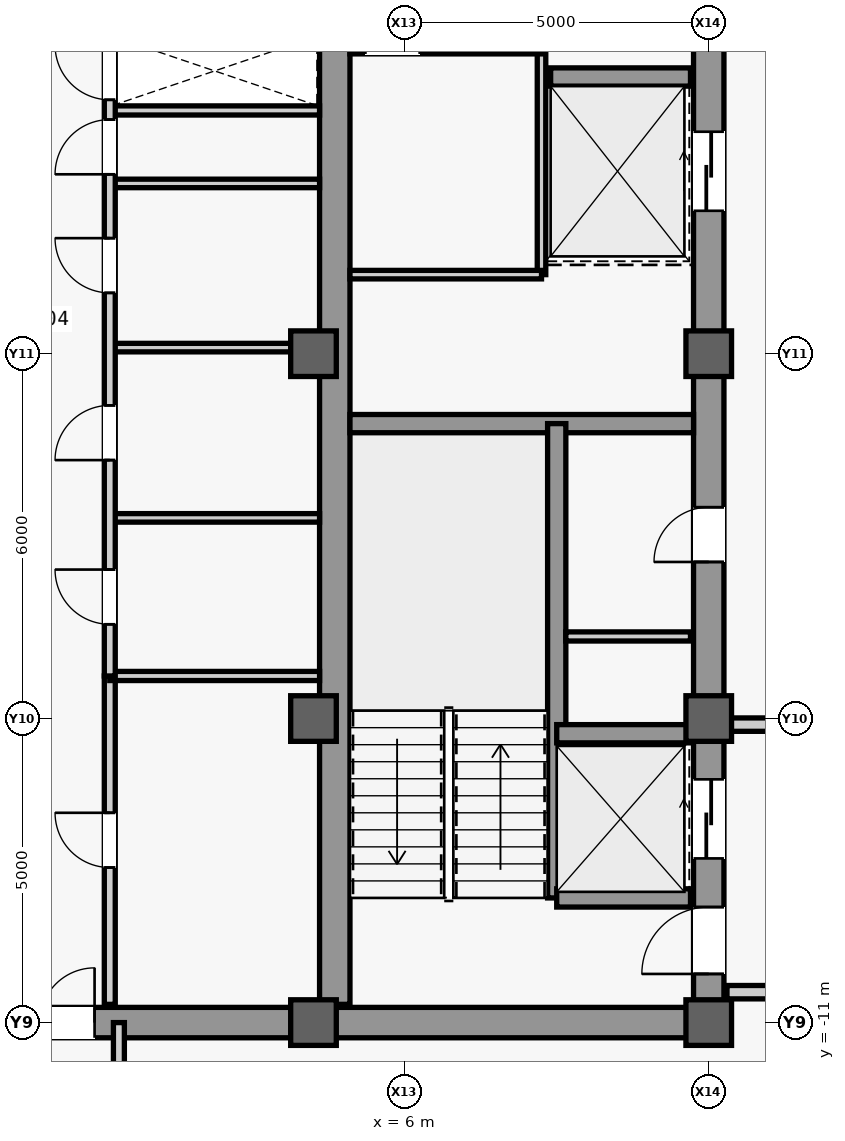
"""IFC4 building model, lengths in metres.
Left out: names, types, materials, properties, quantities, classifications, styles, units other than length and angle.
Written with IfcOpenShell. Run it as: python <this file> out.ifc"""

import sys

from ifc_helpers import new_model, si_unit, direction, frame, frame_2d, origin, origin_2d, place, context, subcontext, project, spatial, rectangle, extrude, source, transform, mapped, element, fill, save


model = new_model("IFC4")
c1 = context("Model", 3, precision=1e-05, world=origin(), true_north=direction((0.0, 1.0)))
c2 = subcontext(c1, "Body", "Model", "MODEL_VIEW")
j1 = project(units=[si_unit("LENGTHUNIT", "METRE"), si_unit("PLANEANGLEUNIT", "RADIAN")], contexts=[c1])
p1 = place(None, origin())
s1 = spatial("IfcSite", under=j1, at=p1, CompositionType="ELEMENT")
p2 = place(p1, origin())
s2 = spatial("IfcBuilding", under=s1, at=p2, CompositionType="ELEMENT")
p3 = place(p2, frame((0.0, 0.0, 326.3)))
s3 = spatial("IfcBuildingStorey", under=s2, at=p3, CompositionType="ELEMENT", Elevation=326.3)
m1 = source(origin(), c2, "Body", "SweptSolid", [
    extrude(rectangle(XDim=22.0, YDim=0.5, at=frame_2d((11.0, 0.0))), origin(), (0.0, 0.0, 1.0), 3.74),
])
p4 = place(p3, frame((11.0, -11.0, 0.0), z_axis=(0.0, 0.0, 1.0), x_axis=(0.0, 1.0, 0.0)))
e1 = element("IfcWall", 1, at=p4, inside=s3, PredefinedType="SHEAR", context=c2, shape_type="MappedRepresentation", body=[
    mapped(m1, transform((0.0, 0.0, 0.0), scale=1.0)),
])
m2 = source(origin(), c2, "Body", "SweptSolid", [
    extrude(rectangle(XDim=1.1, YDim=2.2, at=frame_2d((0.55, 1.1))), frame((0.0, 0.26, 0.0), z_axis=(0.0, -1.0, 0.0), x_axis=(1.0, 0.0, 0.0)), (0.0, 0.0, 1.0), 0.52),
])
p5 = place(p4, frame((0.8, 0.0, 0.0)))
e2 = element("IfcOpeningElement", 2, at=p5, cuts=e1, PredefinedType="OPENING", context=c2, shape_type="MappedRepresentation", body=[
    mapped(m2, transform((0.0, 0.0, 0.0), scale=1.0)),
])
m3 = source(origin(), c2, "Body", "SweptSolid", [
    extrude(rectangle(XDim=0.9, YDim=2.15, at=frame_2d((0.45, 1.075))), frame((0.0, 0.26, 0.0), z_axis=(0.0, -1.0, 0.0), x_axis=(1.0, 0.0, 0.0)), (0.0, 0.0, 1.0), 0.52),
])
p6 = place(p4, frame((7.575, 0.0, 0.0)))
e3 = element("IfcOpeningElement", 3, at=p6, cuts=e1, PredefinedType="OPENING", context=c2, shape_type="MappedRepresentation", body=[
    mapped(m3, transform((0.0, 0.0, 0.0), scale=1.0)),
])
m4 = source(origin(), c2, "Body", "SweptSolid", [
    extrude(rectangle(XDim=1.2, YDim=2.3, at=frame_2d((0.6, 1.15))), frame((0.0, 0.26, 0.0), z_axis=(0.0, -1.0, 0.0), x_axis=(1.0, 0.0, 0.0)), (0.0, 0.0, 1.0), 0.52),
])
p7 = place(p4, frame((17.6, 0.0, 0.0)))
e4 = element("IfcOpeningElement", 4, at=p7, cuts=e1, PredefinedType="OPENING", context=c2, shape_type="MappedRepresentation", body=[
    mapped(m4, transform((0.0, 0.0, 0.0), scale=1.0)),
])
p8 = place(p4, frame((19.6, 0.0, 0.0)))
e5 = element("IfcOpeningElement", 5, at=p8, cuts=e1, PredefinedType="OPENING", context=c2, shape_type="MappedRepresentation", body=[
    mapped(m4, transform((0.0, 0.0, 0.0), scale=1.0)),
])
m5 = source(origin(), c2, "Body", "SweptSolid", [
    extrude(rectangle(XDim=1.3, YDim=2.3, at=frame_2d((0.65, 1.15))), frame((0.0, 0.26, 0.0), z_axis=(0.0, -1.0, 0.0), x_axis=(1.0, 0.0, 0.0)), (0.0, 0.0, 1.0), 0.52),
])
p9 = place(p4, frame((2.7, 0.0, 0.0)))
e6 = element("IfcOpeningElement", 6, at=p9, cuts=e1, PredefinedType="OPENING", context=c2, shape_type="MappedRepresentation", body=[
    mapped(m5, transform((0.0, 0.0, 0.0), scale=1.0)),
])
p10 = place(p4, frame((13.35, 0.0, 0.0)))
e7 = element("IfcOpeningElement", 7, at=p10, cuts=e1, PredefinedType="OPENING", context=c2, shape_type="MappedRepresentation", body=[
    mapped(m5, transform((0.0, 0.0, 0.0), scale=1.0)),
])
m6 = source(origin(), c2, "Body", "SweptSolid", [
    extrude(rectangle(XDim=21.4, YDim=0.5, at=frame_2d((10.7, 0.0))), origin(), (0.0, 0.0, 1.0), 3.74),
])
p11 = place(p3, frame((4.85, -10.7, 0.0), z_axis=(0.0, 0.0, 1.0), x_axis=(0.0, 1.0, 0.0)))
e8 = element("IfcWall", 8, at=p11, inside=s3, PredefinedType="SHEAR", context=c2, shape_type="MappedRepresentation", body=[
    mapped(m6, transform((0.0, 0.0, 0.0), scale=1.0)),
])
m7 = source(origin(), c2, "Body", "SweptSolid", [
    extrude(rectangle(XDim=5.9, YDim=0.5, at=frame_2d((2.95, 0.0))), origin(), (0.0, 0.0, 1.0), 3.74),
])
p12 = place(p3, frame((4.85, -11.0, 0.0), z_axis=(0.0, 0.0, 1.0), x_axis=(1.0, 0.0, 0.0)))
e9 = element("IfcWall", 9, at=p12, inside=s3, PredefinedType="SHEAR", context=c2, shape_type="MappedRepresentation", body=[
    mapped(m7, transform((0.0, 0.0, 0.0), scale=1.0)),
])
m8 = source(origin(), c2, "Body", "SweptSolid", [
    extrude(rectangle(XDim=5.65, YDim=0.3, at=frame_2d((2.825, 0.0))), origin(), (0.0, 0.0, 1.0), 3.74),
])
p13 = place(p3, frame((5.1, -1.15, 0.0), z_axis=(0.0, 0.0, 1.0), x_axis=(1.0, 0.0, 0.0)))
e10 = element("IfcWall", 10, at=p13, inside=s3, PredefinedType="SHEAR", context=c2, shape_type="MappedRepresentation", body=[
    mapped(m8, transform((0.0, 0.0, 0.0), scale=1.0)),
])
m9 = source(origin(), c2, "Body", "SweptSolid", [
    extrude(rectangle(XDim=9.2, YDim=0.5, at=frame_2d((4.6, 0.0))), origin(), (0.0, 0.0, 1.0), 3.74),
])
p14 = place(p3, frame((-4.6, -11.0, 0.0), z_axis=(0.0, 0.0, 1.0), x_axis=(1.0, 0.0, 0.0)))
e11 = element("IfcWall", 11, at=p14, inside=s3, PredefinedType="SHEAR", context=c2, shape_type="MappedRepresentation", body=[
    mapped(m9, transform((0.0, 0.0, 0.0), scale=1.0)),
])
m10 = source(origin(), c2, "Body", "SweptSolid", [
    extrude(rectangle(XDim=1.8, YDim=2.25, at=frame_2d((0.9, 1.125))), frame((0.0, 0.26, 0.0), z_axis=(0.0, -1.0, 0.0), x_axis=(1.0, 0.0, 0.0)), (0.0, 0.0, 1.0), 0.52),
])
p15 = place(p14, frame((3.7, 0.0, 0.0)))
e12 = element("IfcOpeningElement", 12, at=p15, cuts=e11, PredefinedType="OPENING", context=c2, shape_type="MappedRepresentation", body=[
    mapped(m10, transform((0.0, 0.0, 0.0), scale=1.0)),
])
m11 = source(origin(), c2, "Body", "SweptSolid", [
    extrude(rectangle(XDim=0.75, YDim=0.75, at=origin_2d()), origin(), (0.0, 0.0, 1.0), 4.0),
])
for number, where, z_axis, x_axis in (
    (13, (4.5, -11.0, 0.0), (0.0, 0.0, 1.0), (1.0, 0.0, 0.0)),
    (14, (4.5, -6.0, 0.0), (0.0, 0.0, 1.0), (1.0, 0.0, 0.0)),
    (15, (4.5, 0.0, 0.0), (0.0, 0.0, 1.0), (1.0, 0.0, 0.0)),
    (16, (11.0, -11.0, 0.0), (0.0, 0.0, 1.0), (1.0, 0.0, 0.0)),
    (17, (11.0, -6.0, 0.0), (0.0, 0.0, 1.0), (1.0, 0.0, 0.0)),
    (18, (11.0, 0.0, 0.0), (0.0, 0.0, 1.0), (1.0, 0.0, 0.0)),
):
    element("IfcColumn", number, at=place(p3, frame(where, z_axis=z_axis, x_axis=x_axis)), inside=s3, PredefinedType="COLUMN", context=c2, shape_type="MappedRepresentation", body=[
        mapped(m11, transform((0.0, 0.0, 0.0), scale=1.0)),
    ])
m12 = source(origin(), c2, "Body", "SweptSolid", [
    extrude(rectangle(XDim=7.8, YDim=0.3, at=frame_2d((3.9, 0.0))), origin(), (0.0, 0.0, 1.0), 3.74),
])
p16 = place(p3, frame((8.5, -8.95, 0.0), z_axis=(0.0, 0.0, 1.0), x_axis=(0.0, 1.0, 0.0)))
e19 = element("IfcWall", 19, at=p16, inside=s3, PredefinedType="SHEAR", context=c2, shape_type="MappedRepresentation", body=[
    mapped(m12, transform((0.0, 0.0, 0.0), scale=1.0)),
])
m13 = source(origin(), c2, "Body", "SweptSolid", [
    extrude(rectangle(XDim=2.2, YDim=0.3, at=frame_2d((1.1, 0.0))), origin(), (0.0, 0.0, 1.0), 3.74),
])
for number, where, z_axis, x_axis in (
    (20, (8.5, -8.95, 0.0), (0.0, 0.0, 1.0), (1.0, 0.0, 0.0)),
    (21, (8.5, -6.25, 0.0), (0.0, 0.0, 1.0), (1.0, 0.0, 0.0)),
):
    element("IfcWall", number, at=place(p3, frame(where, z_axis=z_axis, x_axis=x_axis)), inside=s3, PredefinedType="SHEAR", context=c2, shape_type="MappedRepresentation", body=[
        mapped(m13, transform((0.0, 0.0, 0.0), scale=1.0)),
    ])
m14 = source(origin(), c2, "Body", "SweptSolid", [
    extrude(rectangle(XDim=2.3, YDim=0.3, at=frame_2d((1.15, 0.0))), origin(), (0.0, 0.0, 1.0), 3.74),
])
p17 = place(p3, frame((8.4, 4.55, 0.0), z_axis=(0.0, 0.0, 1.0), x_axis=(1.0, 0.0, 0.0)))
e22 = element("IfcWall", 22, at=p17, inside=s3, PredefinedType="SHEAR", context=c2, shape_type="MappedRepresentation", body=[
    mapped(m14, transform((0.0, 0.0, 0.0), scale=1.0)),
])
m15 = source(origin(), c2, "Body", "SweptSolid", [
    extrude(rectangle(XDim=2.05, YDim=0.15, at=frame_2d((1.025, 0.0))), origin(), (0.0, 0.0, 1.0), 3.74),
])
p18 = place(p3, frame((8.65, -4.65, 0.0), z_axis=(0.0, 0.0, 1.0), x_axis=(1.0, 0.0, 0.0)))
e23 = element("IfcWall", 23, at=p18, inside=s3, PredefinedType="PARTITIONING", context=c2, shape_type="MappedRepresentation", body=[
    mapped(m15, transform((0.0, 0.0, 0.0), scale=1.0)),
])
m16 = source(origin(), c2, "Body", "SweptSolid", [
    extrude(rectangle(XDim=9.4, YDim=0.14, at=frame_2d((4.7, 0.0))), origin(), (0.0, 0.0, 1.0), 3.74),
])
p19 = place(p3, frame((8.25, 1.3, 0.0), z_axis=(0.0, 0.0, 1.0), x_axis=(0.0, 1.0, 0.0)))
e24 = element("IfcWall", 24, at=p19, inside=s3, PredefinedType="PARTITIONING", context=c2, shape_type="MappedRepresentation", body=[
    mapped(m16, transform((0.0, 0.0, 0.0), scale=1.0)),
])
m17 = source(origin(), c2, "Body", "SweptSolid", [
    extrude(rectangle(XDim=3.15, YDim=0.14, at=frame_2d((1.575, 0.0))), origin(), (0.0, 0.0, 1.0), 3.74),
])
p20 = place(p3, frame((5.1, 1.3, 0.0), z_axis=(0.0, 0.0, 1.0), x_axis=(1.0, 0.0, 0.0)))
e25 = element("IfcWall", 25, at=p20, inside=s3, PredefinedType="PARTITIONING", context=c2, shape_type="MappedRepresentation", body=[
    mapped(m17, transform((0.0, 0.0, 0.0), scale=1.0)),
])
p21 = place(p3, frame((5.1, 5.0, 0.0), z_axis=(0.0, 0.0, 1.0), x_axis=(1.0, 0.0, 0.0)))
e26 = element("IfcWall", 26, at=p21, inside=s3, PredefinedType="PARTITIONING", context=c2, shape_type="MappedRepresentation", body=[
    mapped(m17, transform((0.0, 0.0, 0.0), scale=1.0)),
])
m18 = source(origin(), c2, "Body", "SweptSolid", [
    extrude(rectangle(XDim=0.9, YDim=2.15, at=frame_2d((0.45, 1.075))), frame((0.0, 0.08, 0.0), z_axis=(0.0, -1.0, 0.0), x_axis=(1.0, 0.0, 0.0)), (0.0, 0.0, 1.0), 0.16),
])
p22 = place(p21, frame((0.25, 0.0, 0.0)))
e27 = element("IfcOpeningElement", 27, at=p22, cuts=e26, PredefinedType="OPENING", context=c2, shape_type="MappedRepresentation", body=[
    mapped(m18, transform((0.0, 0.0, 0.0), scale=1.0)),
])
m19 = source(origin(), c2, "Body", "SweptSolid", [
    extrude(rectangle(XDim=4.05, YDim=0.22, at=frame_2d((2.025, 0.0))), origin(), (0.0, 0.0, 1.0), 3.74),
])
p23 = place(p3, frame((11.3, -10.5, 0.0), z_axis=(0.0, 0.0, 1.0), x_axis=(1.0, 0.0, 0.0)))
e28 = element("IfcWall", 28, at=p23, inside=s3, PredefinedType="PARTITIONING", context=c2, shape_type="MappedRepresentation", body=[
    mapped(m19, transform((0.0, 0.0, 0.0), scale=1.0)),
])
m20 = source(origin(), c2, "Body", "SweptSolid", [
    extrude(rectangle(XDim=4.05, YDim=0.22, at=frame_2d((2.025, 0.0))), origin(), (0.0, 0.0, 1.0), 3.124),
])
p24 = place(p3, frame((11.3, -6.1, 0.0), z_axis=(0.0, 0.0, 1.0), x_axis=(1.0, 0.0, 0.0)))
e29 = element("IfcWall", 29, at=p24, inside=s3, PredefinedType="PARTITIONING", context=c2, shape_type="MappedRepresentation", body=[
    mapped(m20, transform((0.0, 0.0, 0.0), scale=1.0)),
])
m21 = source(origin(), c2, "Body", "SweptSolid", [
    extrude(rectangle(XDim=3.45, YDim=0.15, at=frame_2d((1.725, 0.0))), origin(), (0.0, 0.0, 1.0), 3.74),
])
p25 = place(p3, frame((1.15, 4.0, 0.0), z_axis=(0.0, 0.0, 1.0), x_axis=(1.0, 0.0, 0.0)))
e30 = element("IfcWall", 30, at=p25, inside=s3, PredefinedType="PARTITIONING", context=c2, shape_type="MappedRepresentation", body=[
    mapped(m21, transform((0.0, 0.0, 0.0), scale=1.0)),
])
m22 = source(origin(), c2, "Body", "SweptSolid", [
    extrude(rectangle(XDim=5.4, YDim=0.18, at=frame_2d((2.7, 0.0))), origin(), (0.0, 0.0, 1.0), 3.74),
])
p26 = place(p3, frame((1.15, -10.7, 0.0), z_axis=(0.0, 0.0, 1.0), x_axis=(0.0, 1.0, 0.0)))
e31 = element("IfcWall", 31, at=p26, inside=s3, PredefinedType="PARTITIONING", context=c2, shape_type="MappedRepresentation", body=[
    mapped(m22, transform((0.0, 0.0, 0.0), scale=1.0)),
])
m23 = source(origin(), c2, "Body", "SweptSolid", [
    extrude(rectangle(XDim=0.9, YDim=2.15, at=frame_2d((0.45, 1.075))), frame((0.0, 0.1, 0.0), z_axis=(0.0, -1.0, 0.0), x_axis=(1.0, 0.0, 0.0)), (0.0, 0.0, 1.0), 0.2),
])
p27 = place(p26, frame((2.25, 0.0, 0.0)))
e32 = element("IfcOpeningElement", 32, at=p27, cuts=e31, PredefinedType="OPENING", context=c2, shape_type="MappedRepresentation", body=[
    mapped(m23, transform((0.0, 0.0, 0.0), scale=1.0)),
])
p28 = place(p3, frame((1.15, -5.3, 0.0), z_axis=(0.0, 0.0, 1.0), x_axis=(1.0, 0.0, 0.0)))
e33 = element("IfcWall", 33, at=p28, inside=s3, PredefinedType="PARTITIONING", context=c2, shape_type="MappedRepresentation", body=[
    mapped(m21, transform((0.0, 0.0, 0.0), scale=1.0)),
])
m24 = source(origin(), c2, "Body", "SweptSolid", [
    extrude(rectangle(XDim=3.45, YDim=0.14, at=frame_2d((1.725, 0.0))), origin(), (0.0, 0.0, 1.0), 3.74),
])
p29 = place(p3, frame((1.15, -2.7, 0.0), z_axis=(0.0, 0.0, 1.0), x_axis=(1.0, 0.0, 0.0)))
e34 = element("IfcWall", 34, at=p29, inside=s3, PredefinedType="PARTITIONING", context=c2, shape_type="MappedRepresentation", body=[
    mapped(m24, transform((0.0, 0.0, 0.0), scale=1.0)),
])
m25 = source(origin(), c2, "Body", "SweptSolid", [
    extrude(rectangle(XDim=3.45, YDim=0.14, at=frame_2d((1.725, 0.0))), origin(), (0.0, 0.0, 1.0), 3.045),
])
p30 = place(p3, frame((1.15, 0.1, 0.0), z_axis=(0.0, 0.0, 1.0), x_axis=(1.0, 0.0, 0.0)))
e35 = element("IfcWall", 35, at=p30, inside=s3, PredefinedType="PARTITIONING", context=c2, shape_type="MappedRepresentation", body=[
    mapped(m25, transform((0.0, 0.0, 0.0), scale=1.0)),
])
p31 = place(p3, frame((1.15, 2.8, 0.0), z_axis=(0.0, 0.0, 1.0), x_axis=(1.0, 0.0, 0.0)))
e36 = element("IfcWall", 36, at=p31, inside=s3, PredefinedType="PARTITIONING", context=c2, shape_type="MappedRepresentation", body=[
    mapped(m24, transform((0.0, 0.0, 0.0), scale=1.0)),
])
m26 = source(origin(), c2, "Body", "SweptSolid", [
    extrude(rectangle(XDim=10.6, YDim=0.18, at=frame_2d((5.3, 0.0))), origin(), (0.0, 0.0, 1.0), 3.74),
])
p32 = place(p3, frame((1.15, -5.3, 0.0), z_axis=(0.0, 0.0, 1.0), x_axis=(0.0, 1.0, 0.0)))
e37 = element("IfcWall", 37, at=p32, inside=s3, PredefinedType="PARTITIONING", context=c2, shape_type="MappedRepresentation", body=[
    mapped(m26, transform((0.0, 0.0, 0.0), scale=1.0)),
])
p33 = place(p32, frame((0.85, 0.0, 0.0)))
e38 = element("IfcOpeningElement", 38, at=p33, cuts=e37, PredefinedType="OPENING", context=c2, shape_type="MappedRepresentation", body=[
    mapped(m23, transform((0.0, 0.0, 0.0), scale=1.0)),
])
p34 = place(p32, frame((3.55, 0.0, 0.0)))
e39 = element("IfcOpeningElement", 39, at=p34, cuts=e37, PredefinedType="OPENING", context=c2, shape_type="MappedRepresentation", body=[
    mapped(m23, transform((0.0, 0.0, 0.0), scale=1.0)),
])
p35 = place(p32, frame((6.3, 0.0, 0.0)))
e40 = element("IfcOpeningElement", 40, at=p35, cuts=e37, PredefinedType="OPENING", context=c2, shape_type="MappedRepresentation", body=[
    mapped(m23, transform((0.0, 0.0, 0.0), scale=1.0)),
])
p36 = place(p32, frame((8.25, 0.0, 0.0)))
e41 = element("IfcOpeningElement", 41, at=p36, cuts=e37, PredefinedType="OPENING", context=c2, shape_type="MappedRepresentation", body=[
    mapped(m23, transform((0.0, 0.0, 0.0), scale=1.0)),
])
p37 = place(p32, frame((9.475, 0.0, 0.0)))
e42 = element("IfcOpeningElement", 42, at=p37, cuts=e37, PredefinedType="OPENING", context=c2, shape_type="MappedRepresentation", body=[
    mapped(m23, transform((0.0, 0.0, 0.0), scale=1.0)),
])
m27 = source(origin(), c2, "Body", "SweptSolid", [
    extrude(rectangle(XDim=6.0, YDim=0.18, at=frame_2d((3.0, 0.0))), origin(), (0.0, 0.0, 1.0), 3.74),
])
p38 = place(p3, frame((1.3, -17.0, 0.0), z_axis=(0.0, 0.0, 1.0), x_axis=(0.0, 1.0, 0.0)))
e43 = element("IfcWall", 43, at=p38, inside=s3, PredefinedType="PARTITIONING", context=c2, shape_type="MappedRepresentation", body=[
    mapped(m27, transform((0.0, 0.0, 0.0), scale=1.0)),
])
m28 = source(origin(), c2, "Body", "SweptSolid", [
    extrude(rectangle(XDim=1.1, YDim=2.2, at=frame_2d((0.55, 1.1))), frame((0.0, 0.025, 0.0), z_axis=(0.0, -1.0, 0.0), x_axis=(1.0, 0.0, 0.0)), (0.0, 0.0, 1.0), 0.05),
])
p39 = place(p5, origin())
e44 = element("IfcDoor", 44, at=p39, inside=s3, OperationType="SINGLE_SWING_LEFT", PredefinedType="DOOR", context=c2, shape_type="MappedRepresentation", body=[
    mapped(m28, transform((0.0, 0.0, 0.0), scale=1.0)),
])
fill(e2, e44)
m29 = source(origin(), c2, "Body", "SweptSolid", [
    extrude(rectangle(XDim=0.9, YDim=2.15, at=frame_2d((0.45, 1.075))), frame((0.0, 0.025, 0.0), z_axis=(0.0, -1.0, 0.0), x_axis=(1.0, 0.0, 0.0)), (0.0, 0.0, 1.0), 0.05),
])
p40 = place(p6, origin())
e45 = element("IfcDoor", 45, at=p40, inside=s3, OperationType="SINGLE_SWING_LEFT", PredefinedType="DOOR", context=c2, shape_type="MappedRepresentation", body=[
    mapped(m29, transform((0.0, 0.0, 0.0), scale=1.0)),
])
fill(e3, e45)
p41 = place(p27, origin())
e46 = element("IfcDoor", 46, at=p41, inside=s3, OperationType="SINGLE_SWING_RIGHT", PredefinedType="DOOR", context=c2, shape_type="MappedRepresentation", body=[
    mapped(m29, transform((0.0, 0.0, 0.0), scale=1.0)),
])
fill(e32, e46)
m30 = source(origin(), c2, "Body", "SweptSolid", [
    extrude(rectangle(XDim=1.8, YDim=2.25, at=frame_2d((0.9, 1.125))), frame((0.0, 0.025, 0.0), z_axis=(0.0, -1.0, 0.0), x_axis=(1.0, 0.0, 0.0)), (0.0, 0.0, 1.0), 0.05),
])
p42 = place(p15, origin())
e47 = element("IfcDoor", 47, at=p42, inside=s3, OperationType="SINGLE_SWING_LEFT", PredefinedType="DOOR", context=c2, shape_type="MappedRepresentation", body=[
    mapped(m30, transform((0.0, 0.0, 0.0), scale=1.0)),
])
fill(e12, e47)
p43 = place(p33, origin())
e48 = element("IfcDoor", 48, at=p43, inside=s3, OperationType="SINGLE_SWING_RIGHT", PredefinedType="DOOR", context=c2, shape_type="MappedRepresentation", body=[
    mapped(m29, transform((0.0, 0.0, 0.0), scale=1.0)),
])
fill(e38, e48)
p44 = place(p34, origin())
e49 = element("IfcDoor", 49, at=p44, inside=s3, OperationType="SINGLE_SWING_LEFT", PredefinedType="DOOR", context=c2, shape_type="MappedRepresentation", body=[
    mapped(m29, transform((0.0, 0.0, 0.0), scale=1.0)),
])
fill(e39, e49)
p45 = place(p35, origin())
e50 = element("IfcDoor", 50, at=p45, inside=s3, OperationType="SINGLE_SWING_RIGHT", PredefinedType="DOOR", context=c2, shape_type="MappedRepresentation", body=[
    mapped(m29, transform((0.0, 0.0, 0.0), scale=1.0)),
])
fill(e40, e50)
p46 = place(p36, origin())
e51 = element("IfcDoor", 51, at=p46, inside=s3, OperationType="SINGLE_SWING_LEFT", PredefinedType="DOOR", context=c2, shape_type="MappedRepresentation", body=[
    mapped(m29, transform((0.0, 0.0, 0.0), scale=1.0)),
])
fill(e41, e51)
p47 = place(p37, origin())
e52 = element("IfcDoor", 52, at=p47, inside=s3, OperationType="SINGLE_SWING_RIGHT", PredefinedType="DOOR", context=c2, shape_type="MappedRepresentation", body=[
    mapped(m29, transform((0.0, 0.0, 0.0), scale=1.0)),
])
fill(e42, e52)
m31 = source(origin(), c2, "Body", "SweptSolid", [
    extrude(rectangle(XDim=1.3, YDim=2.3, at=frame_2d((0.65, 1.15))), frame((0.0, 0.025, 0.0), z_axis=(0.0, -1.0, 0.0), x_axis=(1.0, 0.0, 0.0)), (0.0, 0.0, 1.0), 0.05),
])
p48 = place(p9, origin())
e53 = element("IfcDoor", 53, at=p48, inside=s3, OperationType="SLIDING_TO_LEFT", PredefinedType="DOOR", context=c2, shape_type="MappedRepresentation", body=[
    mapped(m31, transform((0.0, 0.0, 0.0), scale=1.0)),
])
fill(e6, e53)
p49 = place(p10, origin())
e54 = element("IfcDoor", 54, at=p49, inside=s3, OperationType="SLIDING_TO_LEFT", PredefinedType="DOOR", context=c2, shape_type="MappedRepresentation", body=[
    mapped(m31, transform((0.0, 0.0, 0.0), scale=1.0)),
])
fill(e7, e54)
save(model, sys.argv[1])
